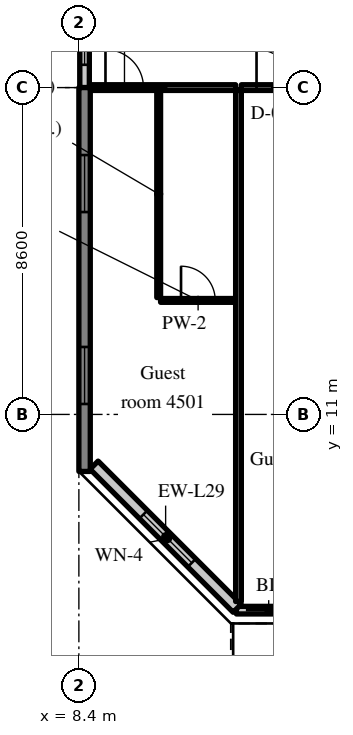
"""IFC4 building model, lengths in metres.
Left out: names, types, materials, properties, quantities, classifications, styles, units other than length and angle.
Written with IfcOpenShell. Run it as: python <this file> out.ifc"""

import sys

from ifc_helpers import new_model, si_unit, direction, frame, frame_2d, origin, place, context, subcontext, project, spatial, rectangle, extrude, source, transform, mapped, element, fill, save


model = new_model("IFC4")
c1 = context("Model", 3, precision=1e-05, world=origin(), true_north=direction((0.0, 1.0)))
c2 = subcontext(c1, "Body", "Model", "MODEL_VIEW")
j1 = project(units=[si_unit("LENGTHUNIT", "METRE"), si_unit("PLANEANGLEUNIT", "RADIAN")], contexts=[c1])
p1 = place(None, origin())
s1 = spatial("IfcSite", under=j1, at=p1, CompositionType="ELEMENT")
p2 = place(p1, origin())
s2 = spatial("IfcBuilding", under=s1, at=p2, CompositionType="ELEMENT")
p3 = place(p2, frame((0.0, 0.0, 185.8)))
s3 = spatial("IfcBuildingStorey", under=s2, at=p3, CompositionType="ELEMENT", Elevation=185.8)
m1 = source(origin(), c2, "Body", "SweptSolid", [
    extrude(rectangle(XDim=10.1, YDim=0.3, at=frame_2d((5.05, 0.0))), origin(), (0.0, 0.0, 1.0), 3.52),
])
p4 = place(p3, frame((8.55, 9.5, 0.0), z_axis=(0.0, 0.0, 1.0), x_axis=(0.0, 1.0, 0.0)))
e1 = element("IfcWall", 1, at=p4, inside=s3, PredefinedType="SHEAR", context=c2, shape_type="MappedRepresentation", body=[
    mapped(m1, transform((0.0, 0.0, 0.0), scale=1.0)),
])
m2 = source(origin(), c2, "Body", "SweptSolid", [
    extrude(rectangle(XDim=1.5, YDim=1.5, at=frame_2d((0.75, 0.75))), frame((0.0, 0.16, 0.0), z_axis=(0.0, -1.0, 0.0), x_axis=(1.0, 0.0, 0.0)), (0.0, 0.0, 1.0), 0.32),
])
p5 = place(p4, frame((1.775, 0.0, 0.9)))
e2 = element("IfcOpeningElement", 2, at=p5, cuts=e1, PredefinedType="OPENING", context=c2, shape_type="MappedRepresentation", body=[
    mapped(m2, transform((0.0, 0.0, 0.0), scale=1.0)),
])
p6 = place(p4, frame((6.825, 0.0, 0.9)))
e3 = element("IfcOpeningElement", 3, at=p6, cuts=e1, PredefinedType="OPENING", context=c2, shape_type="MappedRepresentation", body=[
    mapped(m2, transform((0.0, 0.0, 0.0), scale=1.0)),
])
m3 = source(origin(), c2, "Body", "SweptSolid", [
    extrude(rectangle(XDim=4.105, YDim=0.2, at=frame_2d((2.052, 0.0))), origin(), (0.0, 0.0, 1.0), 2.87),
])
p7 = place(p3, frame((12.545, 5.85, 0.0), z_axis=(0.0, 0.0, 1.0), x_axis=(1.0, 0.0, 0.0)))
e4 = element("IfcWall", 4, at=p7, inside=s3, PredefinedType="SOLIDWALL", context=c2, shape_type="MappedRepresentation", body=[
    mapped(m3, transform((0.0, 0.0, 0.0), scale=1.0)),
])
m4 = source(origin(), c2, "Body", "SweptSolid", [
    extrude(rectangle(XDim=1.2, YDim=2.4, at=frame_2d((0.6, 1.2))), frame((0.0, 0.11, 0.0), z_axis=(0.0, -1.0, 0.0), x_axis=(1.0, 0.0, 0.0)), (0.0, 0.0, 1.0), 0.22),
])
p8 = place(p7, frame((0.25, 0.0, 0.0)))
e5 = element("IfcOpeningElement", 5, at=p8, cuts=e4, PredefinedType="OPENING", context=c2, shape_type="MappedRepresentation", body=[
    mapped(m4, transform((0.0, 0.0, 0.0), scale=1.0)),
])
m5 = source(origin(), c2, "Body", "SweptSolid", [
    extrude(rectangle(XDim=1.5, YDim=1.5, at=frame_2d((0.75, 0.75))), frame((0.0, 0.11, 0.0), z_axis=(0.0, -1.0, 0.0), x_axis=(1.0, 0.0, 0.0)), (0.0, 0.0, 1.0), 0.22),
])
p9 = place(p7, frame((2.355, 0.0, 0.9)))
e6 = element("IfcOpeningElement", 6, at=p9, cuts=e4, PredefinedType="OPENING", context=c2, shape_type="MappedRepresentation", body=[
    mapped(m5, transform((0.0, 0.0, 0.0), scale=1.0)),
])
m6 = source(origin(), c2, "Body", "SweptSolid", [
    extrude(rectangle(XDim=5.326, YDim=0.3, at=frame_2d((2.663, 0.0))), origin(), (0.0, 0.0, 1.0), 3.52),
])
p10 = place(p3, frame((8.8, 9.666, 0.0), z_axis=(0.0, 0.0, 1.0), x_axis=(0.707083859269, -0.707129702361, 0.0)))
e7 = element("IfcWall", 7, at=p10, inside=s3, PredefinedType="SOLIDWALL", context=c2, shape_type="MappedRepresentation", body=[
    mapped(m6, transform((0.0, 0.0, 0.0), scale=1.0)),
])
m7 = source(origin(), c2, "Body", "SweptSolid", [
    extrude(rectangle(XDim=1.8, YDim=1.5, at=frame_2d((0.9, 0.75))), frame((0.0, 0.16, 0.0), z_axis=(0.0, -1.0, 0.0), x_axis=(1.0, 0.0, 0.0)), (0.0, 0.0, 1.0), 0.32),
])
p11 = place(p10, frame((1.836, 0.0, 0.9)))
e8 = element("IfcOpeningElement", 8, at=p11, cuts=e7, PredefinedType="OPENING", context=c2, shape_type="MappedRepresentation", body=[
    mapped(m7, transform((0.0, 0.0, 0.0), scale=1.0)),
])
m8 = source(origin(), c2, "Body", "SweptSolid", [
    extrude(rectangle(XDim=2.4, YDim=0.25, at=frame_2d((1.2, 0.0))), origin(), (0.0, 0.0, 1.0), 2.62),
])
p12 = place(p3, frame((8.55, 19.6, 0.0), z_axis=(0.0, 0.0, 1.0), x_axis=(0.0, 1.0, 0.0)))
e9 = element("IfcWall", 9, at=p12, inside=s3, PredefinedType="SOLIDWALL", context=c2, shape_type="MappedRepresentation", body=[
    mapped(m8, transform((0.0, 0.0, 0.0), scale=1.0)),
])
m9 = source(origin(), c2, "Body", "SweptSolid", [
    extrude(rectangle(XDim=1.2, YDim=1.5, at=frame_2d((0.6, 0.75))), frame((0.0, 0.135, 0.0), z_axis=(0.0, -1.0, 0.0), x_axis=(1.0, 0.0, 0.0)), (0.0, 0.0, 1.0), 0.27),
])
p13 = place(p12, frame((0.6, 0.0, 0.9)))
e10 = element("IfcOpeningElement", 10, at=p13, cuts=e9, PredefinedType="OPENING", context=c2, shape_type="MappedRepresentation", body=[
    mapped(m9, transform((0.0, 0.0, 0.0), scale=1.0)),
])
m10 = source(origin(), c2, "Body", "SweptSolid", [
    extrude(rectangle(XDim=5.45, YDim=0.1, at=frame_2d((2.725, 0.0))), origin(), (0.0, 0.0, 1.0), 3.52),
])
p14 = place(p3, frame((10.5, 14.075, 0.0), z_axis=(0.0, 0.0, 1.0), x_axis=(0.0, 1.0, 0.0)))
e11 = element("IfcWall", 11, at=p14, inside=s3, PredefinedType="PARTITIONING", context=c2, shape_type="MappedRepresentation", body=[
    mapped(m10, transform((0.0, 0.0, 0.0), scale=1.0)),
])
m11 = source(origin(), c2, "Body", "SweptSolid", [
    extrude(rectangle(XDim=1.975, YDim=0.1, at=frame_2d((0.987, 0.0))), origin(), (0.0, 0.0, 1.0), 3.52),
])
p15 = place(p3, frame((10.55, 14.0, 0.0), z_axis=(0.0, 0.0, 1.0), x_axis=(1.0, 0.0, 0.0)))
e12 = element("IfcWall", 12, at=p15, inside=s3, PredefinedType="PARTITIONING", context=c2, shape_type="MappedRepresentation", body=[
    mapped(m11, transform((0.0, 0.0, 0.0), scale=1.0)),
])
m12 = source(origin(), c2, "Body", "SweptSolid", [
    extrude(rectangle(XDim=0.9, YDim=2.1, at=frame_2d((0.45, 1.05))), frame((0.0, 0.06, 0.0), z_axis=(0.0, -1.0, 0.0), x_axis=(1.0, 0.0, 0.0)), (0.0, 0.0, 1.0), 0.12),
])
p16 = place(p15, frame((0.538, 0.0, 0.0)))
e13 = element("IfcOpeningElement", 13, at=p16, cuts=e12, PredefinedType="OPENING", context=c2, shape_type="MappedRepresentation", body=[
    mapped(m12, transform((0.0, 0.0, 0.0), scale=1.0)),
])
m13 = source(origin(), c2, "Body", "SweptSolid", [
    extrude(rectangle(XDim=3.825, YDim=0.15, at=frame_2d((1.913, 0.0))), origin(), (0.0, 0.0, 1.0), 2.82),
])
p17 = place(p3, frame((8.7, 19.6, 0.0), z_axis=(0.0, 0.0, 1.0), x_axis=(1.0, 0.0, 0.0)))
e14 = element("IfcWall", 14, at=p17, inside=s3, PredefinedType="PARTITIONING", context=c2, shape_type="MappedRepresentation", body=[
    mapped(m13, transform((0.0, 0.0, 0.0), scale=1.0)),
])
m14 = source(origin(), c2, "Body", "SweptSolid", [
    extrude(rectangle(XDim=1.0, YDim=2.1, at=frame_2d((0.5, 1.05))), frame((0.0, 0.085, 0.0), z_axis=(0.0, -1.0, 0.0), x_axis=(1.0, 0.0, 0.0)), (0.0, 0.0, 1.0), 0.17),
])
p18 = place(p17, frame((0.4, 0.0, 0.0)))
e15 = element("IfcOpeningElement", 15, at=p18, cuts=e14, PredefinedType="OPENING", context=c2, shape_type="MappedRepresentation", body=[
    mapped(m14, transform((0.0, 0.0, 0.0), scale=1.0)),
])
m15 = source(origin(), c2, "Body", "SweptSolid", [
    extrude(rectangle(XDim=3.975, YDim=0.15, at=frame_2d((1.987, 0.0))), origin(), (0.0, 0.0, 1.0), 2.82),
])
p19 = place(p3, frame((12.675, 19.6, 0.0), z_axis=(0.0, 0.0, 1.0), x_axis=(1.0, 0.0, 0.0)))
e16 = element("IfcWall", 16, at=p19, inside=s3, PredefinedType="PARTITIONING", context=c2, shape_type="MappedRepresentation", body=[
    mapped(m15, transform((0.0, 0.0, 0.0), scale=1.0)),
])
p20 = place(p19, frame((0.4, 0.0, 0.0)))
e17 = element("IfcOpeningElement", 17, at=p20, cuts=e16, PredefinedType="OPENING", context=c2, shape_type="MappedRepresentation", body=[
    mapped(m14, transform((0.0, 0.0, 0.0), scale=1.0)),
])
m16 = source(origin(), c2, "Body", "SweptSolid", [
    extrude(rectangle(XDim=13.447, YDim=0.15, at=frame_2d((6.724, 0.0))), origin(), (0.0, 0.0, 1.0), 3.52),
])
p21 = place(p3, frame((12.6, 6.078, 0.0), z_axis=(0.0, 0.0, 1.0), x_axis=(0.0, 1.0, 0.0)))
e18 = element("IfcWall", 18, at=p21, inside=s3, PredefinedType="PARTITIONING", context=c2, shape_type="MappedRepresentation", body=[
    mapped(m16, transform((0.0, 0.0, 0.0), scale=1.0)),
])
m17 = source(origin(), c2, "Body", "SweptSolid", [
    extrude(rectangle(XDim=1.2, YDim=2.4, at=frame_2d((0.6, 1.2))), frame((0.0, 0.025, 0.0), z_axis=(0.0, -1.0, 0.0), x_axis=(1.0, 0.0, 0.0)), (0.0, 0.0, 1.0), 0.05),
])
p22 = place(p8, origin())
e19 = element("IfcDoor", 19, at=p22, inside=s3, OperationType="SLIDING_TO_LEFT", PredefinedType="DOOR", context=c2, shape_type="MappedRepresentation", body=[
    mapped(m17, transform((0.0, 0.0, 0.0), scale=1.0)),
])
fill(e5, e19)
m18 = source(origin(), c2, "Body", "SweptSolid", [
    extrude(rectangle(XDim=1.8, YDim=1.5, at=frame_2d((0.9, 0.75))), frame((0.0, 0.03, 0.0), z_axis=(0.0, -1.0, 0.0), x_axis=(1.0, 0.0, 0.0)), (0.0, 0.0, 1.0), 0.06),
])
p23 = place(p11, origin())
e20 = element("IfcWindow", 20, at=p23, inside=s3, PartitioningType="SINGLE_PANEL", PredefinedType="WINDOW", context=c2, shape_type="MappedRepresentation", body=[
    mapped(m18, transform((0.0, 0.0, 0.0), scale=1.0)),
])
fill(e8, e20)
m19 = source(origin(), c2, "Body", "SweptSolid", [
    extrude(rectangle(XDim=1.5, YDim=1.5, at=frame_2d((0.75, 0.75))), frame((0.0, 0.03, 0.0), z_axis=(0.0, -1.0, 0.0), x_axis=(1.0, 0.0, 0.0)), (0.0, 0.0, 1.0), 0.06),
])
p24 = place(p5, origin())
e21 = element("IfcWindow", 21, at=p24, inside=s3, PartitioningType="SINGLE_PANEL", PredefinedType="WINDOW", context=c2, shape_type="MappedRepresentation", body=[
    mapped(m19, transform((0.0, 0.0, 0.0), scale=1.0)),
])
fill(e2, e21)
p25 = place(p6, origin())
e22 = element("IfcWindow", 22, at=p25, inside=s3, PartitioningType="SINGLE_PANEL", PredefinedType="WINDOW", context=c2, shape_type="MappedRepresentation", body=[
    mapped(m19, transform((0.0, 0.0, 0.0), scale=1.0)),
])
fill(e3, e22)
m20 = source(origin(), c2, "Body", "SweptSolid", [
    extrude(rectangle(XDim=1.2, YDim=1.5, at=frame_2d((0.6, 0.75))), frame((0.0, 0.03, 0.0), z_axis=(0.0, -1.0, 0.0), x_axis=(1.0, 0.0, 0.0)), (0.0, 0.0, 1.0), 0.06),
])
p26 = place(p13, origin())
e23 = element("IfcWindow", 23, at=p26, inside=s3, PartitioningType="SINGLE_PANEL", PredefinedType="WINDOW", context=c2, shape_type="MappedRepresentation", body=[
    mapped(m20, transform((0.0, 0.0, 0.0), scale=1.0)),
])
fill(e10, e23)
m21 = source(origin(), c2, "Body", "SweptSolid", [
    extrude(rectangle(XDim=0.9, YDim=2.1, at=frame_2d((0.45, 1.05))), frame((0.0, 0.025, 0.0), z_axis=(0.0, -1.0, 0.0), x_axis=(1.0, 0.0, 0.0)), (0.0, 0.0, 1.0), 0.05),
])
p27 = place(p16, origin())
e24 = element("IfcDoor", 24, at=p27, inside=s3, OperationType="SINGLE_SWING_LEFT", PredefinedType="DOOR", context=c2, shape_type="MappedRepresentation", body=[
    mapped(m21, transform((0.0, 0.0, 0.0), scale=1.0)),
])
fill(e13, e24)
m22 = source(origin(), c2, "Body", "SweptSolid", [
    extrude(rectangle(XDim=1.0, YDim=2.1, at=frame_2d((0.5, 1.05))), frame((0.0, 0.025, 0.0), z_axis=(0.0, -1.0, 0.0), x_axis=(1.0, 0.0, 0.0)), (0.0, 0.0, 1.0), 0.05),
])
p28 = place(p18, origin())
e25 = element("IfcDoor", 25, at=p28, inside=s3, OperationType="SINGLE_SWING_LEFT", PredefinedType="DOOR", context=c2, shape_type="MappedRepresentation", body=[
    mapped(m22, transform((0.0, 0.0, 0.0), scale=1.0)),
])
fill(e15, e25)
p29 = place(p20, origin())
e26 = element("IfcDoor", 26, at=p29, inside=s3, OperationType="SINGLE_SWING_LEFT", PredefinedType="DOOR", context=c2, shape_type="MappedRepresentation", body=[
    mapped(m22, transform((0.0, 0.0, 0.0), scale=1.0)),
])
fill(e17, e26)
save(model, sys.argv[1])
